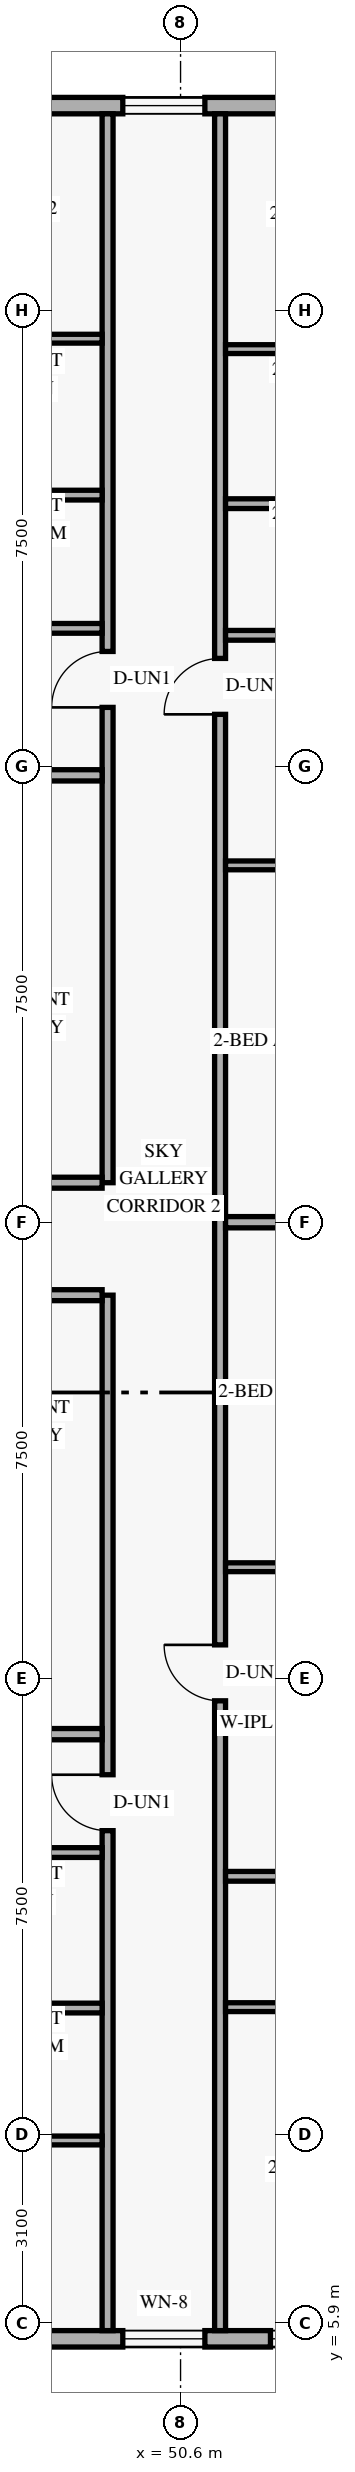
"""IFC4 building model, lengths in metres.
Left out: names, types, materials, properties, quantities, classifications, styles, units other than length and angle.
Written with IfcOpenShell. Run it as: python <this file> out.ifc"""

import sys

from ifc_helpers import new_model, si_unit, direction, frame, frame_2d, origin, place, context, subcontext, project, spatial, rectangle, extrude, element, fill, save


model = new_model("IFC4")
c1 = context("Model", 3, precision=1e-05, world=origin(), true_north=direction((0.0, 1.0)))
c2 = subcontext(c1, "Body", "Model", "MODEL_VIEW")
j1 = project(units=[si_unit("LENGTHUNIT", "METRE"), si_unit("PLANEANGLEUNIT", "RADIAN")], contexts=[c1])
p1 = place(None, origin())
s1 = spatial("IfcSite", under=j1, at=p1, CompositionType="ELEMENT")
p2 = place(p1, origin())
s2 = spatial("IfcBuilding", under=s1, at=p2, CompositionType="ELEMENT")
p3 = place(p2, frame((0.0, 0.0, 205.8)))
s3 = spatial("IfcBuildingStorey", under=s2, at=p3, CompositionType="ELEMENT", Elevation=205.8)
p4 = place(p3, frame((25.82, 5.635, 0.0), z_axis=(0.0, 0.0, 1.0), x_axis=(1.0, 0.0, 0.0)))
e1 = element("IfcWall", 1, at=p4, inside=s3, PredefinedType="SOLIDWALL", context=c2, shape_type="SweptSolid", body=[
    extrude(rectangle(XDim=32.96, YDim=0.27, at=frame_2d((16.48, 0.0))), origin(), (0.0, 0.0, 1.0), 3.36),
])
p5 = place(p4, frame((3.795, 0.0, 0.85)))
e2 = element("IfcOpeningElement", 2, at=p5, cuts=e1, PredefinedType="OPENING", context=c2, shape_type="SweptSolid", body=[
    extrude(rectangle(XDim=1.35, YDim=1.55, at=frame_2d((0.675, 0.775))), frame((0.0, 0.145, 0.0), z_axis=(0.0, -1.0, 0.0), x_axis=(1.0, 0.0, 0.0)), (0.0, 0.0, 1.0), 0.29),
])
p6 = place(p4, frame((15.661, 0.0, 0.85)))
e3 = element("IfcOpeningElement", 3, at=p6, cuts=e1, PredefinedType="OPENING", context=c2, shape_type="SweptSolid", body=[
    extrude(rectangle(XDim=1.35, YDim=1.55, at=frame_2d((0.675, 0.775))), frame((0.0, 0.145, 0.0), z_axis=(0.0, -1.0, 0.0), x_axis=(1.0, 0.0, 0.0)), (0.0, 0.0, 1.0), 0.29),
])
p7 = place(p4, frame((23.83, 0.0, 0.85)))
e4 = element("IfcOpeningElement", 4, at=p7, cuts=e1, PredefinedType="OPENING", context=c2, shape_type="SweptSolid", body=[
    extrude(rectangle(XDim=1.35, YDim=1.55, at=frame_2d((0.675, 0.775))), frame((0.0, 0.145, 0.0), z_axis=(0.0, -1.0, 0.0), x_axis=(1.0, 0.0, 0.0)), (0.0, 0.0, 1.0), 0.29),
])
p8 = place(p4, frame((26.259, 0.0, 0.85)))
e5 = element("IfcOpeningElement", 5, at=p8, cuts=e1, PredefinedType="OPENING", context=c2, shape_type="SweptSolid", body=[
    extrude(rectangle(XDim=1.35, YDim=1.55, at=frame_2d((0.675, 0.775))), frame((0.0, 0.145, 0.0), z_axis=(0.0, -1.0, 0.0), x_axis=(1.0, 0.0, 0.0)), (0.0, 0.0, 1.0), 0.29),
])
p9 = place(p4, frame((31.477, 0.0, 0.85)))
e6 = element("IfcOpeningElement", 6, at=p9, cuts=e1, PredefinedType="OPENING", context=c2, shape_type="SweptSolid", body=[
    extrude(rectangle(XDim=1.2, YDim=1.5, at=frame_2d((0.6, 0.75))), frame((0.0, 0.145, 0.0), z_axis=(0.0, -1.0, 0.0), x_axis=(1.0, 0.0, 0.0)), (0.0, 0.0, 1.0), 0.29),
])
p10 = place(p3, frame((58.78, 42.365, 0.0), z_axis=(0.0, 0.0, 1.0), x_axis=(-1.0, 0.0, 0.0)))
e7 = element("IfcWall", 7, at=p10, inside=s3, PredefinedType="SOLIDWALL", context=c2, shape_type="SweptSolid", body=[
    extrude(rectangle(XDim=32.96, YDim=0.27, at=frame_2d((16.48, 0.0))), origin(), (0.0, 0.0, 1.0), 3.36),
])
p11 = place(p10, frame((27.815, 0.0, 0.85)))
e8 = element("IfcOpeningElement", 8, at=p11, cuts=e7, PredefinedType="OPENING", context=c2, shape_type="SweptSolid", body=[
    extrude(rectangle(XDim=1.35, YDim=1.55, at=frame_2d((0.675, 0.775))), frame((0.0, 0.145, 0.0), z_axis=(0.0, -1.0, 0.0), x_axis=(1.0, 0.0, 0.0)), (0.0, 0.0, 1.0), 0.29),
])
p12 = place(p10, frame((17.265, 0.0, 0.85)))
e9 = element("IfcOpeningElement", 9, at=p12, cuts=e7, PredefinedType="OPENING", context=c2, shape_type="SweptSolid", body=[
    extrude(rectangle(XDim=1.35, YDim=1.55, at=frame_2d((0.675, 0.775))), frame((0.0, 0.145, 0.0), z_axis=(0.0, -1.0, 0.0), x_axis=(1.0, 0.0, 0.0)), (0.0, 0.0, 1.0), 0.29),
])
p13 = place(p10, frame((12.934, 0.0, 0.85)))
e10 = element("IfcOpeningElement", 10, at=p13, cuts=e7, PredefinedType="OPENING", context=c2, shape_type="SweptSolid", body=[
    extrude(rectangle(XDim=1.35, YDim=1.55, at=frame_2d((0.675, 0.775))), frame((0.0, 0.145, 0.0), z_axis=(0.0, -1.0, 0.0), x_axis=(1.0, 0.0, 0.0)), (0.0, 0.0, 1.0), 0.29),
])
p14 = place(p10, frame((7.78, 0.0, 0.85)))
e11 = element("IfcOpeningElement", 11, at=p14, cuts=e7, PredefinedType="OPENING", context=c2, shape_type="SweptSolid", body=[
    extrude(rectangle(XDim=1.35, YDim=1.55, at=frame_2d((0.675, 0.775))), frame((0.0, 0.145, 0.0), z_axis=(0.0, -1.0, 0.0), x_axis=(1.0, 0.0, 0.0)), (0.0, 0.0, 1.0), 0.29),
])
p15 = place(p10, frame((1.426, 0.0, 0.85)))
e12 = element("IfcOpeningElement", 12, at=p15, cuts=e7, PredefinedType="OPENING", context=c2, shape_type="SweptSolid", body=[
    extrude(rectangle(XDim=1.35, YDim=1.55, at=frame_2d((0.675, 0.775))), frame((0.0, 0.145, 0.0), z_axis=(0.0, -1.0, 0.0), x_axis=(1.0, 0.0, 0.0)), (0.0, 0.0, 1.0), 0.29),
])
p16 = place(p3, frame((49.4, 5.77, 0.0), z_axis=(0.0, 0.0, 1.0), x_axis=(0.0, 1.0, 0.0)))
e13 = element("IfcWall", 13, at=p16, inside=s3, PredefinedType="STANDARD", context=c2, shape_type="SweptSolid", body=[
    extrude(rectangle(XDim=17.03, YDim=0.18, at=frame_2d((8.515, 0.0))), origin(), (0.0, 0.0, 1.0), 2.803),
])
p17 = place(p16, frame((8.223, 0.0, 0.0)))
e14 = element("IfcOpeningElement", 14, at=p17, cuts=e13, PredefinedType="OPENING", context=c2, shape_type="SweptSolid", body=[
    extrude(rectangle(XDim=0.92, YDim=2.15, at=frame_2d((0.46, 1.075))), frame((0.0, 0.1, 0.0), z_axis=(0.0, -1.0, 0.0), x_axis=(1.0, 0.0, 0.0)), (0.0, 0.0, 1.0), 0.2),
])
p18 = place(p3, frame((49.4, 24.65, 0.0), z_axis=(0.0, 0.0, 1.0), x_axis=(0.0, 1.0, 0.0)))
e15 = element("IfcWall", 15, at=p18, inside=s3, PredefinedType="STANDARD", context=c2, shape_type="SweptSolid", body=[
    extrude(rectangle(XDim=17.58, YDim=0.18, at=frame_2d((8.79, 0.0))), origin(), (0.0, 0.0, 1.0), 2.803),
])
p19 = place(p18, frame((7.817, 0.0, 0.0)))
e16 = element("IfcOpeningElement", 16, at=p19, cuts=e15, PredefinedType="OPENING", context=c2, shape_type="SweptSolid", body=[
    extrude(rectangle(XDim=0.92, YDim=2.15, at=frame_2d((0.46, 1.075))), frame((0.0, 0.1, 0.0), z_axis=(0.0, -1.0, 0.0), x_axis=(1.0, 0.0, 0.0)), (0.0, 0.0, 1.0), 0.2),
])
p20 = place(p3, frame((37.64, 22.8, 0.0), z_axis=(0.0, 0.0, 1.0), x_axis=(1.0, 0.0, 0.0)))
e17 = element("IfcWall", 17, at=p20, inside=s3, PredefinedType="STANDARD", context=c2, shape_type="SweptSolid", body=[
    extrude(rectangle(XDim=11.67, YDim=0.18, at=frame_2d((5.835, 0.0))), origin(), (0.0, 0.0, 1.0), 2.803),
])
p21 = place(p20, frame((0.32, 0.0, 0.0)))
e18 = element("IfcOpeningElement", 18, at=p21, cuts=e17, PredefinedType="OPENING", context=c2, shape_type="SweptSolid", body=[
    extrude(rectangle(XDim=0.92, YDim=2.15, at=frame_2d((0.46, 1.075))), frame((0.0, 0.1, 0.0), z_axis=(0.0, -1.0, 0.0), x_axis=(1.0, 0.0, 0.0)), (0.0, 0.0, 1.0), 0.2),
])
p22 = place(p3, frame((37.64, 24.65, 0.0), z_axis=(0.0, 0.0, 1.0), x_axis=(1.0, 0.0, 0.0)))
e19 = element("IfcWall", 19, at=p22, inside=s3, PredefinedType="STANDARD", context=c2, shape_type="SweptSolid", body=[
    extrude(rectangle(XDim=11.67, YDim=0.18, at=frame_2d((5.835, 0.0))), origin(), (0.0, 0.0, 1.0), 2.803),
])
p23 = place(p22, frame((0.32, 0.0, 0.0)))
e20 = element("IfcOpeningElement", 20, at=p23, cuts=e19, PredefinedType="OPENING", context=c2, shape_type="SweptSolid", body=[
    extrude(rectangle(XDim=0.92, YDim=2.15, at=frame_2d((0.46, 1.075))), frame((0.0, 0.1, 0.0), z_axis=(0.0, -1.0, 0.0), x_axis=(1.0, 0.0, 0.0)), (0.0, 0.0, 1.0), 0.2),
])
p24 = place(p3, frame((51.25, 5.77, 0.0), z_axis=(0.0, 0.0, 1.0), x_axis=(0.0, 1.0, 0.0)))
e21 = element("IfcWall", 21, at=p24, inside=s3, PredefinedType="STANDARD", context=c2, shape_type="SweptSolid", body=[
    extrude(rectangle(XDim=36.46, YDim=0.18, at=frame_2d((18.23, 0.0))), origin(), (0.0, 0.0, 1.0), 2.803),
])
p25 = place(p24, frame((10.358, 0.0, 0.0)))
e22 = element("IfcOpeningElement", 22, at=p25, cuts=e21, PredefinedType="OPENING", context=c2, shape_type="SweptSolid", body=[
    extrude(rectangle(XDim=0.92, YDim=2.15, at=frame_2d((0.46, 1.075))), frame((0.0, 0.1, 0.0), z_axis=(0.0, -1.0, 0.0), x_axis=(1.0, 0.0, 0.0)), (0.0, 0.0, 1.0), 0.2),
])
p26 = place(p24, frame((26.583, 0.0, 0.0)))
e23 = element("IfcOpeningElement", 23, at=p26, cuts=e21, PredefinedType="OPENING", context=c2, shape_type="SweptSolid", body=[
    extrude(rectangle(XDim=0.92, YDim=2.15, at=frame_2d((0.46, 1.075))), frame((0.0, 0.1, 0.0), z_axis=(0.0, -1.0, 0.0), x_axis=(1.0, 0.0, 0.0)), (0.0, 0.0, 1.0), 0.2),
])
p27 = place(p3, frame((51.34, 11.09, 0.0), z_axis=(0.0, 0.0, 1.0), x_axis=(1.0, 0.0, 0.0)))
e24 = element("IfcWall", 24, at=p27, inside=s3, PredefinedType="PARTITIONING", context=c2, shape_type="SweptSolid", body=[
    extrude(rectangle(XDim=10.79, YDim=0.145, at=frame_2d((5.395, 0.0))), origin(), (0.0, 0.0, 1.0), 2.879),
])
p28 = place(p27, frame((3.719, 0.0, 0.0)))
e25 = element("IfcOpeningElement", 25, at=p28, cuts=e24, PredefinedType="OPENING", context=c2, shape_type="SweptSolid", body=[
    extrude(rectangle(XDim=0.88, YDim=2.14, at=frame_2d((0.44, 1.07))), frame((0.0, 0.083, 0.0), z_axis=(0.0, -1.0, 0.0), x_axis=(1.0, 0.0, 0.0)), (0.0, 0.0, 1.0), 0.165),
])
p29 = place(p27, frame((7.896, 0.0, 0.0)))
e26 = element("IfcOpeningElement", 26, at=p29, cuts=e24, PredefinedType="OPENING", context=c2, shape_type="SweptSolid", body=[
    extrude(rectangle(XDim=0.88, YDim=2.14, at=frame_2d((0.44, 1.07))), frame((0.0, 0.083, 0.0), z_axis=(0.0, -1.0, 0.0), x_axis=(1.0, 0.0, 0.0)), (0.0, 0.0, 1.0), 0.165),
])
p30 = place(p3, frame((51.34, 15.769, 0.0), z_axis=(0.0, 0.0, 1.0), x_axis=(1.0, 0.0, 0.0)))
e27 = element("IfcWall", 27, at=p30, inside=s3, PredefinedType="PLUMBINGWALL", context=c2, shape_type="SweptSolid", body=[
    extrude(rectangle(XDim=2.636, YDim=0.16, at=frame_2d((1.318, 0.0))), origin(), (0.0, 0.0, 1.0), 3.36),
])
p31 = place(p3, frame((51.34, 13.242, 0.0), z_axis=(0.0, 0.0, 1.0), x_axis=(1.0, 0.0, 0.0)))
e28 = element("IfcWall", 28, at=p31, inside=s3, PredefinedType="PLUMBINGWALL", context=c2, shape_type="SweptSolid", body=[
    extrude(rectangle(XDim=2.476, YDim=0.16, at=frame_2d((1.238, 0.0))), origin(), (0.0, 0.0, 1.0), 3.36),
])
p32 = place(p3, frame((51.34, 18.326, 0.0), z_axis=(0.0, 0.0, 1.0), x_axis=(1.0, 0.0, 0.0)))
e29 = element("IfcWall", 29, at=p32, inside=s3, PredefinedType="PARTITIONING", context=c2, shape_type="SweptSolid", body=[
    extrude(rectangle(XDim=10.79, YDim=0.145, at=frame_2d((5.395, 0.0))), origin(), (0.0, 0.0, 1.0), 2.879),
])
p33 = place(p32, frame((5.365, 0.0, 0.0)))
e30 = element("IfcOpeningElement", 30, at=p33, cuts=e29, PredefinedType="OPENING", context=c2, shape_type="SweptSolid", body=[
    extrude(rectangle(XDim=0.95, YDim=2.15, at=frame_2d((0.475, 1.075))), frame((0.0, 0.083, 0.0), z_axis=(0.0, -1.0, 0.0), x_axis=(1.0, 0.0, 0.0)), (0.0, 0.0, 1.0), 0.165),
])
p34 = place(p3, frame((51.34, 24.0, 0.0), z_axis=(0.0, 0.0, 1.0), x_axis=(1.0, 0.0, 0.0)))
e31 = element("IfcWall", 31, at=p34, inside=s3, PredefinedType="PARTITIONING", context=c2, shape_type="SweptSolid", body=[
    extrude(rectangle(XDim=10.79, YDim=0.185, at=frame_2d((5.395, 0.0))), origin(), (0.0, 0.0, 1.0), 2.879),
])
p35 = place(p3, frame((51.34, 38.36, 0.0), z_axis=(0.0, 0.0, 1.0), x_axis=(1.0, 0.0, 0.0)))
e32 = element("IfcWall", 32, at=p35, inside=s3, PredefinedType="PARTITIONING", context=c2, shape_type="SweptSolid", body=[
    extrude(rectangle(XDim=10.79, YDim=0.145, at=frame_2d((5.395, 0.0))), origin(), (0.0, 0.0, 1.0), 2.879),
])
p36 = place(p35, frame((5.81, 0.0, 0.0)))
e33 = element("IfcOpeningElement", 33, at=p36, cuts=e32, PredefinedType="OPENING", context=c2, shape_type="SweptSolid", body=[
    extrude(rectangle(XDim=0.88, YDim=2.14, at=frame_2d((0.44, 1.07))), frame((0.0, 0.083, 0.0), z_axis=(0.0, -1.0, 0.0), x_axis=(1.0, 0.0, 0.0)), (0.0, 0.0, 1.0), 0.165),
])
p37 = place(p35, frame((8.5, 0.0, 0.0)))
e34 = element("IfcOpeningElement", 34, at=p37, cuts=e32, PredefinedType="OPENING", context=c2, shape_type="SweptSolid", body=[
    extrude(rectangle(XDim=0.88, YDim=2.14, at=frame_2d((0.44, 1.07))), frame((0.0, 0.083, 0.0), z_axis=(0.0, -1.0, 0.0), x_axis=(1.0, 0.0, 0.0)), (0.0, 0.0, 1.0), 0.165),
])
p38 = place(p3, frame((51.34, 33.653, 0.0), z_axis=(0.0, 0.0, 1.0), x_axis=(1.0, 0.0, 0.0)))
e35 = element("IfcWall", 35, at=p38, inside=s3, PredefinedType="PLUMBINGWALL", context=c2, shape_type="SweptSolid", body=[
    extrude(rectangle(XDim=5.53, YDim=0.16, at=frame_2d((2.765, 0.0))), origin(), (0.0, 0.0, 1.0), 2.879),
])
p39 = place(p3, frame((51.34, 35.818, 0.0), z_axis=(0.0, 0.0, 1.0), x_axis=(1.0, 0.0, 0.0)))
e36 = element("IfcWall", 36, at=p39, inside=s3, PredefinedType="PLUMBINGWALL", context=c2, shape_type="SweptSolid", body=[
    extrude(rectangle(XDim=5.37, YDim=0.16, at=frame_2d((2.685, 0.0))), origin(), (0.0, 0.0, 1.0), 2.879),
])
p40 = place(p3, frame((51.34, 29.869, 0.0), z_axis=(0.0, 0.0, 1.0), x_axis=(1.0, 0.0, 0.0)))
e37 = element("IfcWall", 37, at=p40, inside=s3, PredefinedType="PARTITIONING", context=c2, shape_type="SweptSolid", body=[
    extrude(rectangle(XDim=10.79, YDim=0.145, at=frame_2d((5.395, 0.0))), origin(), (0.0, 0.0, 1.0), 2.879),
])
p41 = place(p40, frame((5.365, 0.0, 0.0)))
e38 = element("IfcOpeningElement", 38, at=p41, cuts=e37, PredefinedType="OPENING", context=c2, shape_type="SweptSolid", body=[
    extrude(rectangle(XDim=0.95, YDim=2.15, at=frame_2d((0.475, 1.075))), frame((0.0, 0.083, 0.0), z_axis=(0.0, -1.0, 0.0), x_axis=(1.0, 0.0, 0.0)), (0.0, 0.0, 1.0), 0.165),
])
p42 = place(p3, frame((37.64, 15.58, 0.0), z_axis=(0.0, 0.0, 1.0), x_axis=(1.0, 0.0, 0.0)))
e39 = element("IfcWall", 39, at=p42, inside=s3, PredefinedType="PARTITIONING", context=c2, shape_type="SweptSolid", body=[
    extrude(rectangle(XDim=11.67, YDim=0.185, at=frame_2d((5.835, 0.0))), origin(), (0.0, 0.0, 1.0), 2.803),
])
p43 = place(p3, frame((37.16, 8.897, 0.0), z_axis=(0.0, 0.0, 1.0), x_axis=(1.0, 0.0, 0.0)))
e40 = element("IfcWall", 40, at=p43, inside=s3, PredefinedType="PARTITIONING", context=c2, shape_type="SweptSolid", body=[
    extrude(rectangle(XDim=12.15, YDim=0.145, at=frame_2d((6.075, 0.0))), origin(), (0.0, 0.0, 1.0), 2.803),
])
p44 = place(p43, frame((3.625, 0.0, 0.0)))
e41 = element("IfcOpeningElement", 41, at=p44, cuts=e40, PredefinedType="OPENING", context=c2, shape_type="SweptSolid", body=[
    extrude(rectangle(XDim=0.9, YDim=2.14, at=frame_2d((0.45, 1.07))), frame((0.0, 0.083, 0.0), z_axis=(0.0, -1.0, 0.0), x_axis=(1.0, 0.0, 0.0)), (0.0, 0.0, 1.0), 0.165),
])
p45 = place(p3, frame((44.93, 13.633, 0.0), z_axis=(0.0, 0.0, 1.0), x_axis=(1.0, 0.0, 0.0)))
e42 = element("IfcWall", 42, at=p45, inside=s3, PredefinedType="PLUMBINGWALL", context=c2, shape_type="SweptSolid", body=[
    extrude(rectangle(XDim=4.38, YDim=0.16, at=frame_2d((2.19, 0.0))), origin(), (0.0, 0.0, 1.0), 2.803),
])
p46 = place(p3, frame((45.09, 11.075, 0.0), z_axis=(0.0, 0.0, 1.0), x_axis=(1.0, 0.0, 0.0)))
e43 = element("IfcWall", 43, at=p46, inside=s3, PredefinedType="PLUMBINGWALL", context=c2, shape_type="SweptSolid", body=[
    extrude(rectangle(XDim=4.22, YDim=0.16, at=frame_2d((2.11, 0.0))), origin(), (0.0, 0.0, 1.0), 2.803),
])
p47 = place(p3, frame((38.173, 31.35, 0.0), z_axis=(0.0, 0.0, 1.0), x_axis=(1.0, 0.0, 0.0)))
e44 = element("IfcWall", 44, at=p47, inside=s3, PredefinedType="PARTITIONING", context=c2, shape_type="SweptSolid", body=[
    extrude(rectangle(XDim=11.137, YDim=0.185, at=frame_2d((5.569, 0.0))), origin(), (0.0, 0.0, 1.0), 2.803),
])
p48 = place(p3, frame((37.71, 38.531, 0.0), z_axis=(0.0, 0.0, 1.0), x_axis=(1.0, 0.0, 0.0)))
e45 = element("IfcWall", 45, at=p48, inside=s3, PredefinedType="PARTITIONING", context=c2, shape_type="SweptSolid", body=[
    extrude(rectangle(XDim=11.6, YDim=0.145, at=frame_2d((5.8, 0.0))), origin(), (0.0, 0.0, 1.0), 2.803),
])
p49 = place(p48, frame((2.69, 0.0, 0.0)))
e46 = element("IfcOpeningElement", 46, at=p49, cuts=e45, PredefinedType="OPENING", context=c2, shape_type="SweptSolid", body=[
    extrude(rectangle(XDim=0.88, YDim=2.14, at=frame_2d((0.44, 1.07))), frame((0.0, 0.083, 0.0), z_axis=(0.0, -1.0, 0.0), x_axis=(1.0, 0.0, 0.0)), (0.0, 0.0, 1.0), 0.165),
])
p50 = place(p48, frame((6.14, 0.0, 0.0)))
e47 = element("IfcOpeningElement", 47, at=p50, cuts=e45, PredefinedType="OPENING", context=c2, shape_type="SweptSolid", body=[
    extrude(rectangle(XDim=0.88, YDim=2.14, at=frame_2d((0.44, 1.07))), frame((0.0, 0.083, 0.0), z_axis=(0.0, -1.0, 0.0), x_axis=(1.0, 0.0, 0.0)), (0.0, 0.0, 1.0), 0.165),
])
p51 = place(p3, frame((44.93, 33.768, 0.0), z_axis=(0.0, 0.0, 1.0), x_axis=(1.0, 0.0, 0.0)))
e48 = element("IfcWall", 48, at=p51, inside=s3, PredefinedType="PLUMBINGWALL", context=c2, shape_type="SweptSolid", body=[
    extrude(rectangle(XDim=4.38, YDim=0.16, at=frame_2d((2.19, 0.0))), origin(), (0.0, 0.0, 1.0), 2.803),
])
p52 = place(p3, frame((45.09, 35.959, 0.0), z_axis=(0.0, 0.0, 1.0), x_axis=(1.0, 0.0, 0.0)))
e49 = element("IfcWall", 49, at=p52, inside=s3, PredefinedType="PLUMBINGWALL", context=c2, shape_type="SweptSolid", body=[
    extrude(rectangle(XDim=4.22, YDim=0.16, at=frame_2d((2.11, 0.0))), origin(), (0.0, 0.0, 1.0), 2.803),
])
p53 = place(p7, origin())
e50 = element("IfcWindow", 50, at=p53, inside=s3, PartitioningType="SINGLE_PANEL", PredefinedType="WINDOW", context=c2, shape_type="SweptSolid", body=[
    extrude(rectangle(XDim=1.35, YDim=1.55, at=frame_2d((0.675, 0.775))), frame((0.0, 0.03, 0.0), z_axis=(0.0, -1.0, 0.0), x_axis=(1.0, 0.0, 0.0)), (0.0, 0.0, 1.0), 0.06),
])
fill(e4, e50)
p54 = place(p8, origin())
e51 = element("IfcWindow", 51, at=p54, inside=s3, PartitioningType="SINGLE_PANEL", PredefinedType="WINDOW", context=c2, shape_type="SweptSolid", body=[
    extrude(rectangle(XDim=1.35, YDim=1.55, at=frame_2d((0.675, 0.775))), frame((0.0, 0.03, 0.0), z_axis=(0.0, -1.0, 0.0), x_axis=(1.0, 0.0, 0.0)), (0.0, 0.0, 1.0), 0.06),
])
fill(e5, e51)
p55 = place(p14, origin())
e52 = element("IfcWindow", 52, at=p55, inside=s3, PartitioningType="SINGLE_PANEL", PredefinedType="WINDOW", context=c2, shape_type="SweptSolid", body=[
    extrude(rectangle(XDim=1.35, YDim=1.55, at=frame_2d((0.675, 0.775))), frame((0.0, 0.03, 0.0), z_axis=(0.0, -1.0, 0.0), x_axis=(1.0, 0.0, 0.0)), (0.0, 0.0, 1.0), 0.06),
])
fill(e11, e52)
p56 = place(p25, origin())
e53 = element("IfcDoor", 53, at=p56, inside=s3, OperationType="SINGLE_SWING_RIGHT", PredefinedType="DOOR", context=c2, shape_type="SweptSolid", body=[
    extrude(rectangle(XDim=0.92, YDim=2.15, at=frame_2d((0.46, 1.075))), frame((0.0, 0.025, 0.0), z_axis=(0.0, -1.0, 0.0), x_axis=(1.0, 0.0, 0.0)), (0.0, 0.0, 1.0), 0.05),
])
fill(e22, e53)
p57 = place(p26, origin())
e54 = element("IfcDoor", 54, at=p57, inside=s3, OperationType="SINGLE_SWING_LEFT", PredefinedType="DOOR", context=c2, shape_type="SweptSolid", body=[
    extrude(rectangle(XDim=0.92, YDim=2.15, at=frame_2d((0.46, 1.075))), frame((0.0, 0.025, 0.0), z_axis=(0.0, -1.0, 0.0), x_axis=(1.0, 0.0, 0.0)), (0.0, 0.0, 1.0), 0.05),
])
fill(e23, e54)
p58 = place(p17, origin())
e55 = element("IfcDoor", 55, at=p58, inside=s3, OperationType="SINGLE_SWING_RIGHT", PredefinedType="DOOR", context=c2, shape_type="SweptSolid", body=[
    extrude(rectangle(XDim=0.92, YDim=2.15, at=frame_2d((0.46, 1.075))), frame((0.0, 0.025, 0.0), z_axis=(0.0, -1.0, 0.0), x_axis=(1.0, 0.0, 0.0)), (0.0, 0.0, 1.0), 0.05),
])
fill(e14, e55)
p59 = place(p19, origin())
e56 = element("IfcDoor", 56, at=p59, inside=s3, OperationType="SINGLE_SWING_LEFT", PredefinedType="DOOR", context=c2, shape_type="SweptSolid", body=[
    extrude(rectangle(XDim=0.92, YDim=2.15, at=frame_2d((0.46, 1.075))), frame((0.0, 0.025, 0.0), z_axis=(0.0, -1.0, 0.0), x_axis=(1.0, 0.0, 0.0)), (0.0, 0.0, 1.0), 0.05),
])
fill(e16, e56)
save(model, sys.argv[1])
